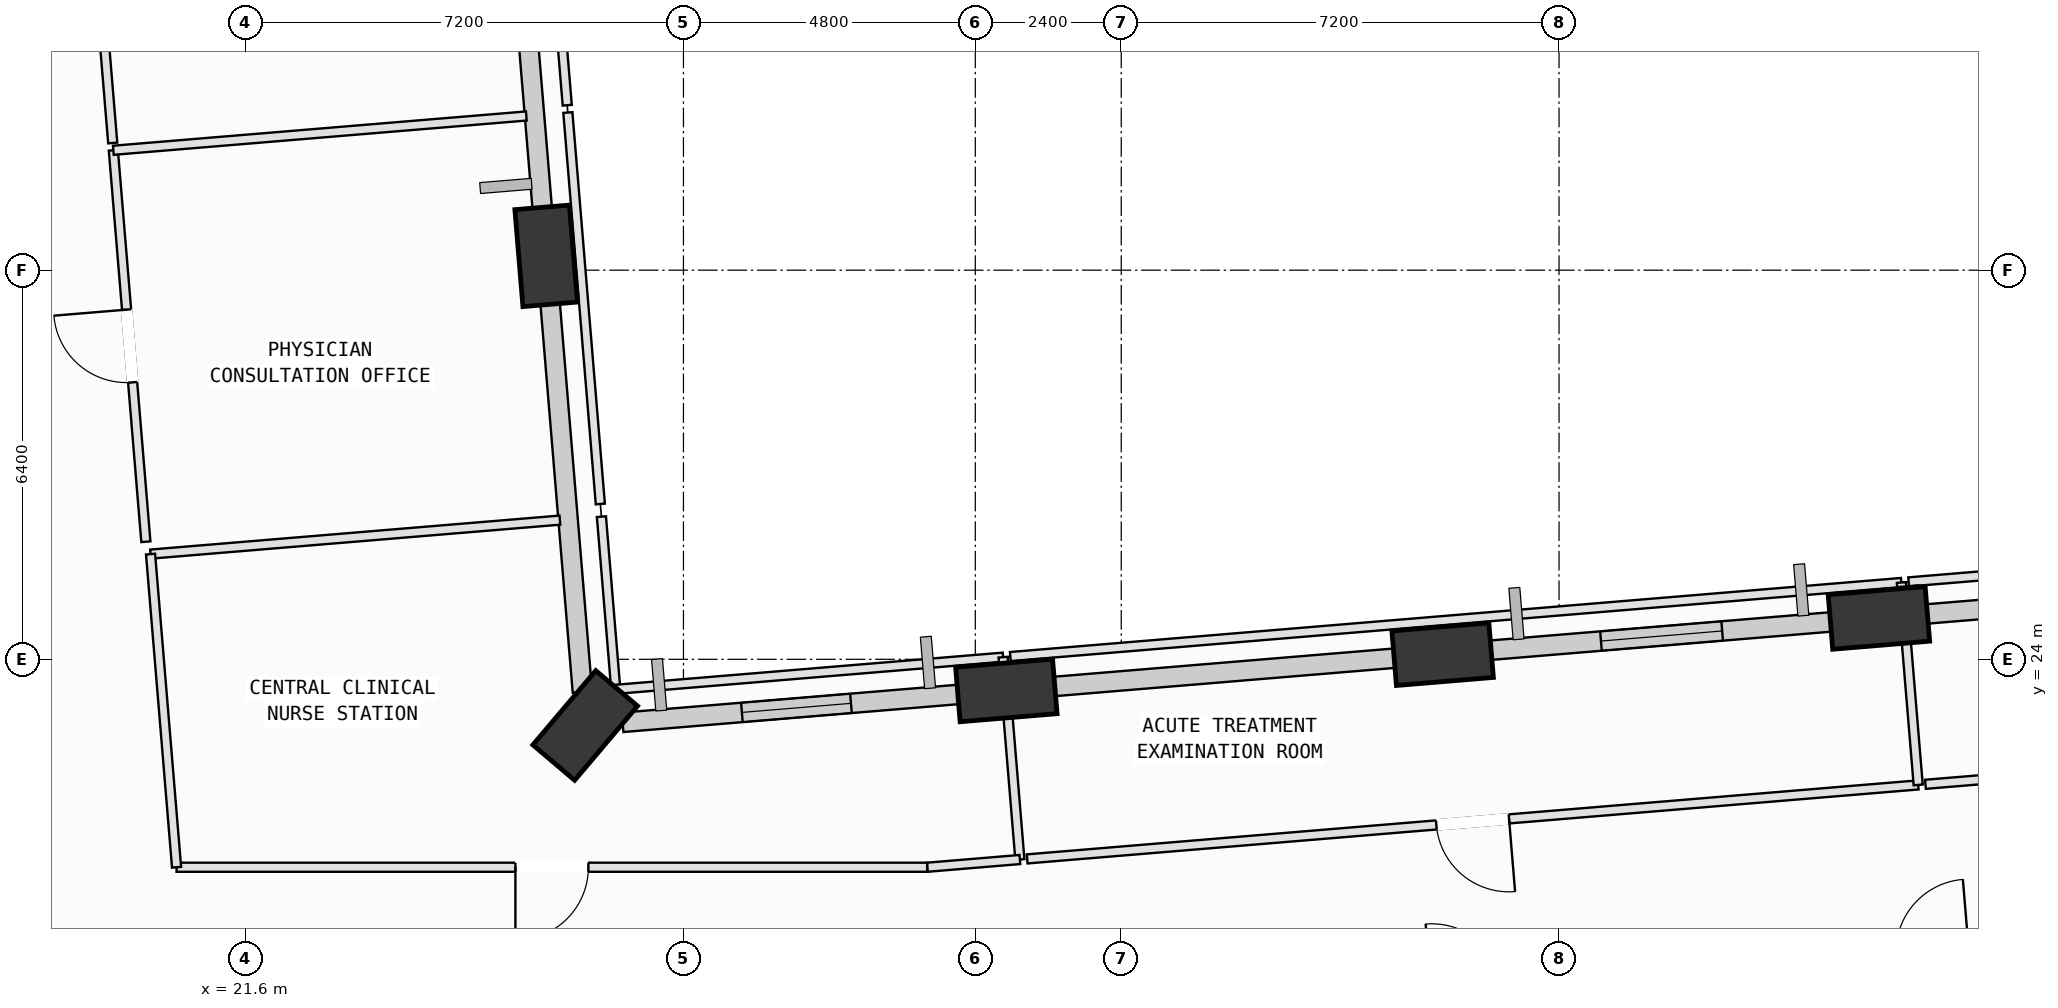
"""IFC4 building model, lengths in metres.
Left out: names, types, materials, properties, quantities, classifications, styles, units other than length and angle.
Written with IfcOpenShell. Run it as: python <this file> out.ifc"""

import sys

from ifc_helpers import new_model, si_unit, direction, frame, frame_2d, origin, origin_2d, place, context, subcontext, project, spatial, rectangle, extrude, element, fill, save


model = new_model("IFC4")
c1 = context("Model", 3, precision=1e-05, world=origin(), true_north=direction((0.0, 1.0)))
c2 = subcontext(c1, "Body", "Model", "MODEL_VIEW")
j1 = project(units=[si_unit("LENGTHUNIT", "METRE"), si_unit("PLANEANGLEUNIT", "RADIAN")], contexts=[c1])
p1 = place(None, origin())
s1 = spatial("IfcSite", under=j1, at=p1, CompositionType="ELEMENT")
p2 = place(p1, origin())
s2 = spatial("IfcBuilding", under=s1, at=p2, CompositionType="ELEMENT")
p3 = place(p2, frame((0.0, 0.0, 43.0)))
s3 = spatial("IfcBuildingStorey", under=s2, at=p3, CompositionType="ELEMENT", Elevation=43.0)
p4 = place(p3, frame((48.461, 24.68, 0.002), z_axis=(0.0, 0.061459648472, 0.99810956894), x_axis=(-0.996565502498, -0.082651664305, 0.005089363324)))
e1 = element("IfcColumn", 1, at=p4, inside=s3, PredefinedType="COLUMN", context=c2, shape_type="SweptSolid", body=[
    extrude(rectangle(XDim=1.6, YDim=0.9, at=origin_2d()), origin(), (0.0, 0.0, 1.0), 4.004),
])
p5 = place(p3, frame((41.286, 24.084, 0.002), z_axis=(0.002686468438, 0.031871284652, 0.999488371169), x_axis=(-0.999995734273, 0.00123148232, 0.002648563136)))
e2 = element("IfcColumn", 2, at=p5, inside=s3, PredefinedType="COLUMN", context=c2, shape_type="SweptSolid", body=[
    extrude(rectangle(XDim=1.6, YDim=0.9, at=origin_2d()), origin(), (0.0, 0.0, 1.0), 3.999),
])
p6 = place(p3, frame((34.11, 23.488, 0.002), z_axis=(0.005436681812, 0.002138020937, 0.999982935533), x_axis=(-0.441780940318, 0.897122827011, 0.000483763271)))
e3 = element("IfcColumn", 3, at=p6, inside=s3, PredefinedType="COLUMN", context=c2, shape_type="SweptSolid", body=[
    extrude(rectangle(XDim=1.6, YDim=0.9, at=origin_2d()), origin(), (0.0, 0.0, 1.0), 3.997),
])
p7 = place(p3, frame((27.184, 22.912, 0.002), z_axis=(0.00806043663, -0.026501738618, 0.999616269981), x_axis=(0.396159552776, 0.917938249982, 0.021141853361)))
e4 = element("IfcColumn", 4, at=p7, inside=s3, PredefinedType="COLUMN", context=c2, shape_type="SweptSolid", body=[
    extrude(rectangle(XDim=1.6, YDim=0.9, at=origin_2d()), origin(), (0.0, 0.0, 1.0), 3.998),
])
p8 = place(p3, frame((26.542, 30.635, 0.002), z_axis=(-0.023929015916, -0.029422922632, 0.999280588134), x_axis=(0.564092616343, 0.824846092772, 0.03779475396)))
e5 = element("IfcColumn", 5, at=p8, inside=s3, PredefinedType="COLUMN", context=c2, shape_type="SweptSolid", body=[
    extrude(rectangle(XDim=1.6, YDim=0.9, at=origin_2d()), origin(), (0.0, 0.0, 1.0), 4.0),
])
p9 = place(p3, frame((49.064, 24.73, 0.0), z_axis=(0.0, 0.0, 1.0), x_axis=(0.99656334349, 0.082834186251, 0.0)))
e6 = element("IfcWall", 6, at=p9, inside=s3, PredefinedType="SOLIDWALL", context=c2, shape_type="SweptSolid", body=[
    extrude(rectangle(XDim=6.024, YDim=0.32, at=frame_2d((3.012, 0.0))), origin(), (0.0, 0.0, 1.0), 3.165),
])
p10 = place(p9, frame((2.209, 0.0, 0.75)))
e7 = element("IfcOpeningElement", 7, at=p10, cuts=e6, PredefinedType="OPENING", context=c2, shape_type="SweptSolid", body=[
    extrude(rectangle(XDim=1.6, YDim=1.95, at=frame_2d((0.8, 0.975))), frame((0.0, 0.17, 0.0), z_axis=(0.0, -1.0, 0.0), x_axis=(1.0, 0.0, 0.0)), (0.0, 0.0, 1.0), 0.34),
])
p11 = place(p3, frame((41.899, 24.135, 0.0), z_axis=(0.0, 0.0, 1.0), x_axis=(0.996568732511, 0.082769326334, 0.0)))
e8 = element("IfcWall", 8, at=p11, inside=s3, PredefinedType="SOLIDWALL", context=c2, shape_type="SweptSolid", body=[
    extrude(rectangle(XDim=6.0, YDim=0.32, at=frame_2d((3.0, 0.0))), origin(), (0.0, 0.0, 1.0), 3.165),
])
p12 = place(p11, frame((1.998, 0.0, 0.75)))
e9 = element("IfcOpeningElement", 9, at=p12, cuts=e8, PredefinedType="OPENING", context=c2, shape_type="SweptSolid", body=[
    extrude(rectangle(XDim=2.0, YDim=1.95, at=frame_2d((1.0, 0.975))), frame((0.0, 0.17, 0.0), z_axis=(0.0, -1.0, 0.0), x_axis=(1.0, 0.0, 0.0)), (0.0, 0.0, 1.0), 0.34),
])
p13 = place(p3, frame((34.727, 23.539, 0.0), z_axis=(0.0, 0.0, 1.0), x_axis=(0.996564574673, 0.082819372771, 0.0)))
e10 = element("IfcWall", 10, at=p13, inside=s3, PredefinedType="SOLIDWALL", context=c2, shape_type="SweptSolid", body=[
    extrude(rectangle(XDim=5.987, YDim=0.32, at=frame_2d((2.994, 0.0))), origin(), (0.0, 0.0, 1.0), 3.165),
])
p14 = place(p3, frame((27.799, 22.963, 0.0), z_axis=(0.0, 0.0, 1.0), x_axis=(0.996567737583, 0.082781304702, 0.0)))
e11 = element("IfcWall", 11, at=p14, inside=s3, PredefinedType="SOLIDWALL", context=c2, shape_type="SweptSolid", body=[
    extrude(rectangle(XDim=5.736, YDim=0.32, at=frame_2d((2.868, 0.0))), origin(), (0.0, 0.0, 1.0), 3.165),
])
p15 = place(p14, frame((1.969, 0.0, 0.75)))
e12 = element("IfcOpeningElement", 12, at=p15, cuts=e11, PredefinedType="OPENING", context=c2, shape_type="SweptSolid", body=[
    extrude(rectangle(XDim=1.8, YDim=2.05, at=frame_2d((0.9, 1.025))), frame((0.0, 0.17, 0.0), z_axis=(0.0, -1.0, 0.0), x_axis=(1.0, 0.0, 0.0)), (0.0, 0.0, 1.0), 0.34),
])
p16 = place(p3, frame((27.138, 23.464, 0.0), z_axis=(0.0, 0.0, 1.0), x_axis=(-0.082810543058, 0.996565308426, 0.0)))
e13 = element("IfcWall", 13, at=p16, inside=s3, PredefinedType="SOLIDWALL", context=c2, shape_type="SweptSolid", body=[
    extrude(rectangle(XDim=6.536, YDim=0.32, at=frame_2d((3.268, 0.0))), origin(), (0.0, 0.0, 1.0), 3.165),
])
p17 = place(p3, frame((26.497, 31.185, 0.0), z_axis=(0.0, 0.0, 1.0), x_axis=(-0.082812984625, 0.996565105539, 0.0)))
e14 = element("IfcWall", 14, at=p17, inside=s3, PredefinedType="SOLIDWALL", context=c2, shape_type="SweptSolid", body=[
    extrude(rectangle(XDim=5.996, YDim=0.32, at=frame_2d((2.998, 0.0))), origin(), (0.0, 0.0, 1.0), 3.165),
])
p18 = place(p17, frame((3.246, 0.0, 0.75)))
e15 = element("IfcOpeningElement", 15, at=p18, cuts=e14, PredefinedType="OPENING", context=c2, shape_type="SweptSolid", body=[
    extrude(rectangle(XDim=1.6, YDim=1.95, at=frame_2d((0.8, 0.975))), frame((0.0, 0.17, 0.0), z_axis=(0.0, -1.0, 0.0), x_axis=(1.0, 0.0, 0.0)), (0.0, 0.0, 1.0), 0.34),
])
p19 = place(p3, frame((20.036, 25.73, 0.0), z_axis=(0.0, 0.0, 1.0), x_axis=(0.99656939588, 0.082761338769, 0.0)))
e16 = element("IfcWall", 16, at=p19, inside=s3, PredefinedType="PARTITIONING", context=c2, shape_type="SweptSolid", body=[
    extrude(rectangle(XDim=6.755, YDim=0.15, at=frame_2d((3.378, 0.0))), origin(), (0.0, 0.0, 1.0), 3.78),
])
p20 = place(p3, frame((27.451, 26.346, 0.0), z_axis=(0.0, 0.0, 1.0), x_axis=(0.082846950407, -0.996562282453, 0.0)))
e17 = element("IfcWall", 17, at=p20, inside=s3, PredefinedType="PARTITIONING", context=c2, shape_type="SweptSolid", body=[
    extrude(rectangle(XDim=2.85, YDim=0.15, at=frame_2d((1.425, 0.0))), origin(), (0.0, 0.0, 1.0), 3.78),
])
p21 = place(p3, frame((27.687, 23.506, 0.0), z_axis=(0.0, 0.0, 1.0), x_axis=(0.996571787755, 0.082732531995, 0.0)))
e18 = element("IfcWall", 18, at=p21, inside=s3, PredefinedType="PARTITIONING", context=c2, shape_type="SweptSolid", body=[
    extrude(rectangle(XDim=6.392, YDim=0.15, at=frame_2d((3.196, 0.0))), origin(), (0.0, 0.0, 1.0), 3.78),
])
p22 = place(p3, frame((34.057, 24.035, 0.0), z_axis=(0.0, 0.0, 1.0), x_axis=(0.082688491374, -0.996575442901, 0.0)))
e19 = element("IfcWall", 19, at=p22, inside=s3, PredefinedType="PARTITIONING", context=c2, shape_type="SweptSolid", body=[
    extrude(rectangle(XDim=3.339, YDim=0.15, at=frame_2d((1.67, 0.0))), origin(), (0.0, 0.0, 1.0), 2.865),
])
p23 = place(p3, frame((34.333, 20.707, 0.0), z_axis=(0.0, 0.0, 1.0), x_axis=(-0.996547959991, -0.083019054661, 0.0)))
e20 = element("IfcWall", 20, at=p23, inside=s3, PredefinedType="PARTITIONING", context=c2, shape_type="SweptSolid", body=[
    extrude(rectangle(XDim=1.529, YDim=0.15, at=frame_2d((0.765, 0.0))), origin(), (0.0, 0.0, 1.0), 3.78),
])
p24 = place(p3, frame((32.809, 20.58, 0.0), z_axis=(0.0, 0.0, 1.0), x_axis=(-1.0, 0.0, 0.0)))
e21 = element("IfcWall", 21, at=p24, inside=s3, PredefinedType="PARTITIONING", context=c2, shape_type="SweptSolid", body=[
    extrude(rectangle(XDim=12.345, YDim=0.15, at=frame_2d((6.172, 0.0))), origin(), (0.0, 0.0, 1.0), 3.78),
])
p25 = place(p24, frame((5.573, 0.0, 0.0)))
e22 = element("IfcOpeningElement", 22, at=p25, cuts=e21, PredefinedType="OPENING", context=c2, shape_type="SweptSolid", body=[
    extrude(rectangle(XDim=1.2, YDim=2.15, at=frame_2d((0.6, 1.075))), frame((0.0, 0.085, 0.0), z_axis=(0.0, -1.0, 0.0), x_axis=(1.0, 0.0, 0.0)), (0.0, 0.0, 1.0), 0.17),
])
p26 = place(p3, frame((20.464, 20.58, 0.0), z_axis=(0.0, 0.0, 1.0), x_axis=(-0.08286562624, 0.996560729704, 0.0)))
e23 = element("IfcWall", 23, at=p26, inside=s3, PredefinedType="PARTITIONING", context=c2, shape_type="SweptSolid", body=[
    extrude(rectangle(XDim=5.168, YDim=0.15, at=frame_2d((2.584, 0.0))), origin(), (0.0, 0.0, 1.0), 3.78),
])
p27 = place(p3, frame((49.107, 21.934, 0.0), z_axis=(0.0, 0.0, 1.0), x_axis=(-0.996568963574, -0.082766544215, 0.0)))
e24 = element("IfcWall", 24, at=p27, inside=s3, PredefinedType="PARTITIONING", context=c2, shape_type="SweptSolid", body=[
    extrude(rectangle(XDim=14.705, YDim=0.15, at=frame_2d((7.352, 0.0))), origin(), (0.0, 0.0, 1.0), 3.78),
])
p28 = place(p27, frame((6.752, 0.0, 0.0)))
e25 = element("IfcOpeningElement", 25, at=p28, cuts=e24, PredefinedType="OPENING", context=c2, shape_type="SweptSolid", body=[
    extrude(rectangle(XDim=1.2, YDim=2.15, at=frame_2d((0.6, 1.075))), frame((0.0, 0.085, 0.0), z_axis=(0.0, -1.0, 0.0), x_axis=(1.0, 0.0, 0.0)), (0.0, 0.0, 1.0), 0.17),
])
p29 = place(p3, frame((34.176, 24.045, 0.0), z_axis=(0.0, 0.0, 1.0), x_axis=(0.99656348355, 0.082832501198, 0.0)))
e26 = element("IfcWall", 26, at=p29, inside=s3, PredefinedType="PARTITIONING", context=c2, shape_type="SweptSolid", body=[
    extrude(rectangle(XDim=14.705, YDim=0.15, at=frame_2d((7.352, 0.0))), origin(), (0.0, 0.0, 1.0), 3.165),
])
p30 = place(p3, frame((48.83, 25.263, 0.0), z_axis=(0.0, 0.0, 1.0), x_axis=(0.082882164129, -0.996559354414, 0.0)))
e27 = element("IfcWall", 27, at=p30, inside=s3, PredefinedType="PARTITIONING", context=c2, shape_type="SweptSolid", body=[
    extrude(rectangle(XDim=3.34, YDim=0.15, at=frame_2d((1.67, 0.0))), origin(), (0.0, 0.0, 1.0), 3.78),
])
p31 = place(p3, frame((62.489, 23.046, 0.0), z_axis=(0.0, 0.0, 1.0), x_axis=(-0.996567106094, -0.082788906577, 0.0)))
e28 = element("IfcWall", 28, at=p31, inside=s3, PredefinedType="PARTITIONING", context=c2, shape_type="SweptSolid", body=[
    extrude(rectangle(XDim=13.309, YDim=0.15, at=frame_2d((6.654, 0.0))), origin(), (0.0, 0.0, 1.0), 3.78),
])
p32 = place(p31, frame((6.054, 0.0, 0.0)))
e29 = element("IfcOpeningElement", 29, at=p32, cuts=e28, PredefinedType="OPENING", context=c2, shape_type="SweptSolid", body=[
    extrude(rectangle(XDim=1.2, YDim=2.15, at=frame_2d((0.6, 1.075))), frame((0.0, 0.085, 0.0), z_axis=(0.0, -1.0, 0.0), x_axis=(1.0, 0.0, 0.0)), (0.0, 0.0, 1.0), 0.17),
])
p33 = place(p3, frame((48.95, 25.273, 0.0), z_axis=(0.0, 0.0, 1.0), x_axis=(0.996566334014, 0.082798199915, 0.0)))
e30 = element("IfcWall", 30, at=p33, inside=s3, PredefinedType="PARTITIONING", context=c2, shape_type="SweptSolid", body=[
    extrude(rectangle(XDim=13.564, YDim=0.15, at=frame_2d((6.782, 0.0))), origin(), (0.0, 0.0, 1.0), 3.165),
])
p34 = place(p3, frame((19.959, 25.934, 0.0), z_axis=(0.0, 0.0, 1.0), x_axis=(-0.082801525688, 0.996566057692, 0.0)))
e31 = element("IfcWall", 31, at=p34, inside=s3, PredefinedType="PARTITIONING", context=c2, shape_type="SweptSolid", body=[
    extrude(rectangle(XDim=6.46, YDim=0.15, at=frame_2d((3.23, 0.0))), origin(), (0.0, 0.0, 1.0), 3.78),
])
p35 = place(p34, frame((2.63, 0.0, 0.0)))
e32 = element("IfcOpeningElement", 32, at=p35, cuts=e31, PredefinedType="OPENING", context=c2, shape_type="SweptSolid", body=[
    extrude(rectangle(XDim=1.2, YDim=2.15, at=frame_2d((0.6, 1.075))), frame((0.0, 0.085, 0.0), z_axis=(0.0, -1.0, 0.0), x_axis=(1.0, 0.0, 0.0)), (0.0, 0.0, 1.0), 0.17),
])
p36 = place(p3, frame((19.424, 32.372, 0.0), z_axis=(0.0, 0.0, 1.0), x_axis=(0.996570419035, 0.08274901754, 0.0)))
e33 = element("IfcWall", 33, at=p36, inside=s3, PredefinedType="PARTITIONING", context=c2, shape_type="SweptSolid", body=[
    extrude(rectangle(XDim=6.815, YDim=0.15, at=frame_2d((3.408, 0.0))), origin(), (0.0, 0.0, 1.0), 3.365),
])
p37 = place(p3, frame((26.899, 32.993, 0.0), z_axis=(0.0, 0.0, 1.0), x_axis=(0.082688926435, -0.996575406803, 0.0)))
e34 = element("IfcWall", 34, at=p37, inside=s3, PredefinedType="PARTITIONING", context=c2, shape_type="SweptSolid", body=[
    extrude(rectangle(XDim=6.46, YDim=0.15, at=frame_2d((3.23, 0.0))), origin(), (0.0, 0.0, 1.0), 3.78),
])
p38 = place(p3, frame((19.414, 32.492, 0.0), z_axis=(0.0, 0.0, 1.0), x_axis=(-0.082730519486, 0.996571954826, 0.0)))
e35 = element("IfcWall", 35, at=p38, inside=s3, PredefinedType="PARTITIONING", context=c2, shape_type="SweptSolid", body=[
    extrude(rectangle(XDim=8.34, YDim=0.15, at=frame_2d((4.17, 0.0))), origin(), (0.0, 0.0, 1.0), 3.78),
])
p39 = place(p38, frame((3.71, 0.0, 0.0)))
e36 = element("IfcOpeningElement", 36, at=p39, cuts=e35, PredefinedType="OPENING", context=c2, shape_type="SweptSolid", body=[
    extrude(rectangle(XDim=0.92, YDim=2.1, at=frame_2d((0.46, 1.05))), frame((0.0, 0.085, 0.0), z_axis=(0.0, -1.0, 0.0), x_axis=(1.0, 0.0, 0.0)), (0.0, 0.0, 1.0), 0.17),
])
p40 = place(p3, frame((26.198, 41.424, 0.0), z_axis=(0.0, 0.0, 1.0), x_axis=(0.082846815437, -0.996562293674, 0.0)))
e37 = element("IfcWall", 37, at=p40, inside=s3, PredefinedType="PARTITIONING", context=c2, shape_type="SweptSolid", body=[
    extrude(rectangle(XDim=8.34, YDim=0.15, at=frame_2d((4.17, 0.0))), origin(), (0.0, 0.0, 1.0), 3.78),
])
p41 = place(p12, origin())
e38 = element("IfcWindow", 38, at=p41, inside=s3, PartitioningType="SINGLE_PANEL", PredefinedType="WINDOW", context=c2, shape_type="SweptSolid", body=[
    extrude(rectangle(XDim=2.0, YDim=1.95, at=frame_2d((1.0, 0.975))), frame((0.0, 0.03, 0.0), z_axis=(0.0, -1.0, 0.0), x_axis=(1.0, 0.0, 0.0)), (0.0, 0.0, 1.0), 0.06),
])
fill(e9, e38)
p42 = place(p15, origin())
e39 = element("IfcWindow", 39, at=p42, inside=s3, PartitioningType="SINGLE_PANEL", PredefinedType="WINDOW", context=c2, shape_type="SweptSolid", body=[
    extrude(rectangle(XDim=1.8, YDim=2.05, at=frame_2d((0.9, 1.025))), frame((0.0, 0.03, 0.0), z_axis=(0.0, -1.0, 0.0), x_axis=(1.0, 0.0, 0.0)), (0.0, 0.0, 1.0), 0.06),
])
fill(e12, e39)
p43 = place(p25, origin())
e40 = element("IfcDoor", 40, at=p43, inside=s3, OperationType="SINGLE_SWING_RIGHT", PredefinedType="DOOR", context=c2, shape_type="SweptSolid", body=[
    extrude(rectangle(XDim=1.2, YDim=2.15, at=frame_2d((0.6, 1.075))), frame((0.0, 0.025, 0.0), z_axis=(0.0, -1.0, 0.0), x_axis=(1.0, 0.0, 0.0)), (0.0, 0.0, 1.0), 0.05),
])
fill(e22, e40)
p44 = place(p28, origin())
e41 = element("IfcDoor", 41, at=p44, inside=s3, OperationType="SINGLE_SWING_LEFT", PredefinedType="DOOR", context=c2, shape_type="SweptSolid", body=[
    extrude(rectangle(XDim=1.2, YDim=2.15, at=frame_2d((0.6, 1.075))), frame((0.0, 0.025, 0.0), z_axis=(0.0, -1.0, 0.0), x_axis=(1.0, 0.0, 0.0)), (0.0, 0.0, 1.0), 0.05),
])
fill(e25, e41)
p45 = place(p35, origin())
e42 = element("IfcDoor", 42, at=p45, inside=s3, OperationType="SINGLE_SWING_RIGHT", PredefinedType="DOOR", context=c2, shape_type="SweptSolid", body=[
    extrude(rectangle(XDim=1.2, YDim=2.15, at=frame_2d((0.6, 1.075))), frame((0.0, 0.025, 0.0), z_axis=(0.0, -1.0, 0.0), x_axis=(1.0, 0.0, 0.0)), (0.0, 0.0, 1.0), 0.05),
])
fill(e32, e42)
save(model, sys.argv[1])
